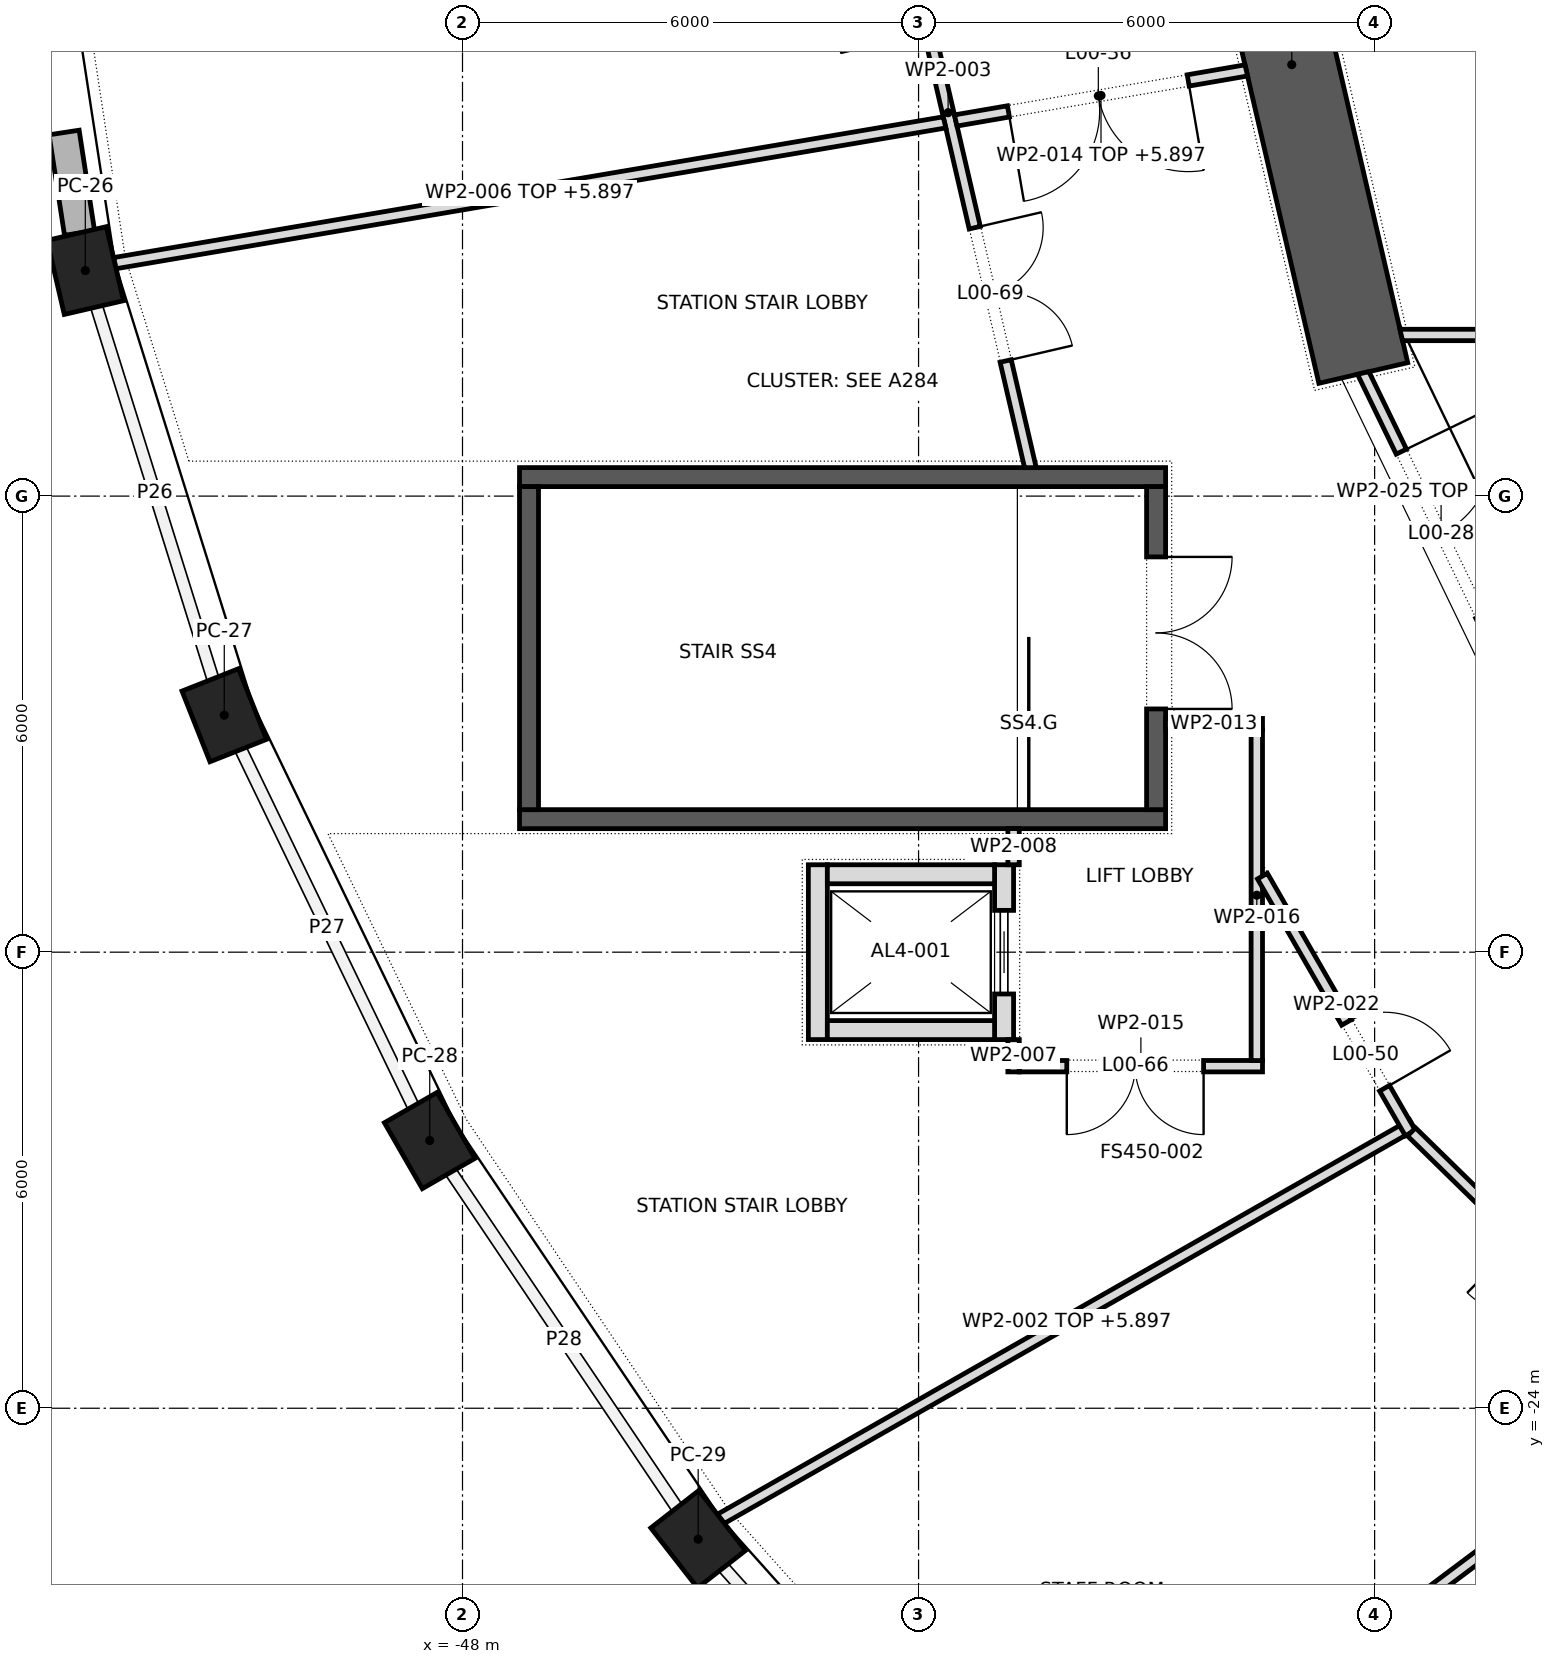
"""IFC4 building model, lengths in metres.
Left out: names, types, materials, properties, quantities, classifications, styles, units other than length and angle.
Written with IfcOpenShell. Run it as: python <this file> out.ifc"""

import sys

from ifc_helpers import new_model, si_unit, direction, frame, frame_2d, origin, origin_2d, place, context, subcontext, project, spatial, polyline, rectangle, outline, extrude, element, fill, save


model = new_model("IFC4")
c1 = context("Model", 3, precision=1e-05, world=origin(), true_north=direction((0.0, 1.0)))
c2 = subcontext(c1, "Body", "Model", "MODEL_VIEW")
j1 = project(units=[si_unit("LENGTHUNIT", "METRE"), si_unit("PLANEANGLEUNIT", "RADIAN")], contexts=[c1])
p1 = place(None, origin())
s1 = spatial("IfcSite", under=j1, at=p1, CompositionType="ELEMENT")
p2 = place(p1, origin())
s2 = spatial("IfcBuilding", under=s1, at=p2, CompositionType="ELEMENT")
p3 = place(p2, origin())
s3 = spatial("IfcBuildingStorey", under=s2, at=p3, CompositionType="ELEMENT", Elevation=0.0)
for number, where, z_axis, x_axis in (
    (1, (-52.962, -9.033, 0.0), (0.0, 0.0, 1.0), (0.226, -0.974, 0.0)),
    (2, (-51.134, -14.883, 0.0), (0.0, 0.0, 1.0), (0.368, -0.93, 0.0)),
    (3, (-48.431, -20.478, 0.0), (0.0, 0.0, 1.0), (0.499, -0.867, 0.0)),
    (4, (-44.899, -25.723, 0.0), (0.0, 0.0, 1.0), (0.615, -0.789, 0.0)),
):
    element("IfcColumn", number, at=place(p3, frame(where, z_axis=z_axis, x_axis=x_axis)), inside=s3, PredefinedType="COLUMN", context=c2, shape_type="SweptSolid", body=[
        extrude(rectangle(XDim=1.0, YDim=0.8, at=origin_2d()), origin(), (0.0, 0.0, 1.0), 7.0),
    ])
p4 = place(p3, frame((-38.032, -2.267, 0.0), z_axis=(0.0, 0.0, 1.0), x_axis=(0.226058185805, -0.974113800657, 0.0)))
e5 = element("IfcWall", 5, at=p4, inside=s3, PredefinedType="SHEAR", context=c2, shape_type="SweptSolid", body=[
    extrude(rectangle(XDim=8.329, YDim=1.2, at=frame_2d((4.165, 0.0))), origin(), (0.0, 0.0, 1.0), 7.0),
])
p5 = place(p3, frame((-53.809, -3.522, 0.0), z_axis=(0.0, 0.0, 1.0), x_axis=(0.151778822734, -0.988414482375, 0.0)))
e6 = element("IfcWall", 6, at=p5, inside=s3, PredefinedType="STANDARD", context=c2, shape_type="SweptSolid", body=[
    extrude(rectangle(XDim=5.075, YDim=0.4, at=frame_2d((2.538, 0.0))), origin(), (0.0, 0.0, 1.0), 6.2),
])
p6 = place(p5, frame((1.337, 0.0, 0.0)))
e7 = element("IfcOpeningElement", 7, at=p6, cuts=e6, PredefinedType="OPENING", context=c2, shape_type="SweptSolid", body=[
    extrude(rectangle(XDim=2.4, YDim=2.4, at=frame_2d((1.2, 1.2))), frame((0.0, 0.212, 0.0), z_axis=(0.0, -1.0, 0.0), x_axis=(1.0, 0.0, 0.0)), (0.0, 0.0, 1.0), 0.424),
])
for number, where, z_axis, x_axis in (
    (8, (-47.25, -11.75, 0.0), (0.0, 0.0, 1.0), (1.0, 0.0, 0.0)),
    (9, (-47.25, -16.25, 0.0), (0.0, 0.0, 1.0), (1.0, 0.0, 0.0)),
):
    element("IfcWall", number, at=place(p3, frame(where, z_axis=z_axis, x_axis=x_axis)), inside=s3, PredefinedType="SHEAR", context=c2, shape_type="SweptSolid", body=[
        extrude(rectangle(XDim=8.5, YDim=0.25, at=frame_2d((4.25, 0.0))), origin(), (0.0, 0.0, 1.0), 6.65),
    ])
p7 = place(p3, frame((-47.125, -16.125, 0.0), z_axis=(0.0, 0.0, 1.0), x_axis=(0.0, 1.0, 0.0)))
e10 = element("IfcWall", 10, at=p7, inside=s3, PredefinedType="SHEAR", context=c2, shape_type="SweptSolid", body=[
    extrude(rectangle(XDim=4.25, YDim=0.25, at=frame_2d((2.125, 0.0))), origin(), (0.0, 0.0, 1.0), 6.65),
])
p8 = place(p3, frame((-38.875, -16.125, 0.0), z_axis=(0.0, 0.0, 1.0), x_axis=(0.0, 1.0, 0.0)))
e11 = element("IfcWall", 11, at=p8, inside=s3, PredefinedType="SHEAR", context=c2, shape_type="SweptSolid", body=[
    extrude(rectangle(XDim=4.25, YDim=0.25, at=frame_2d((2.125, 0.0))), origin(), (0.0, 0.0, 1.0), 6.65),
])
p9 = place(p8, frame((1.325, 0.0, 0.0)))
e12 = element("IfcOpeningElement", 12, at=p9, cuts=e11, PredefinedType="OPENING", context=c2, shape_type="SweptSolid", body=[
    extrude(rectangle(XDim=2.0, YDim=2.1, at=frame_2d((1.0, 1.05))), frame((0.0, 0.137, 0.0), z_axis=(0.0, -1.0, 0.0), x_axis=(1.0, 0.0, 0.0)), (0.0, 0.0, 1.0), 0.274),
])
p10 = place(p3, frame((-43.325, -19.15, 0.0), z_axis=(0.0, 0.0, 1.0), x_axis=(0.0, 1.0, 0.0)))
e13 = element("IfcWall", 13, at=p10, inside=s3, PredefinedType="PARTITIONING", context=c2, shape_type="SweptSolid", body=[
    extrude(rectangle(XDim=2.3, YDim=0.25, at=frame_2d((1.15, 0.0))), origin(), (0.0, 0.0, 1.0), 6.65),
])
p11 = place(p3, frame((-40.875, -19.15, 0.0), z_axis=(0.0, 0.0, 1.0), x_axis=(0.0, 1.0, 0.0)))
e14 = element("IfcWall", 14, at=p11, inside=s3, PredefinedType="PARTITIONING", context=c2, shape_type="SweptSolid", body=[
    extrude(rectangle(XDim=2.3, YDim=0.25, at=frame_2d((1.15, 0.0))), origin(), (0.0, 0.0, 1.0), 6.65),
])
p12 = place(p11, frame((0.6, 0.0, 0.0)))
e15 = element("IfcOpeningElement", 15, at=p12, cuts=e14, PredefinedType="OPENING", context=c2, shape_type="SweptSolid", body=[
    extrude(rectangle(XDim=1.1, YDim=2.1, at=frame_2d((0.55, 1.05))), frame((0.0, 0.137, 0.0), z_axis=(0.0, -1.0, 0.0), x_axis=(1.0, 0.0, 0.0)), (0.0, 0.0, 1.0), 0.274),
])
for number, where, z_axis, x_axis in (
    (16, (-43.2, -16.975, 0.0), (0.0, 0.0, 1.0), (1.0, 0.0, 0.0)),
    (17, (-43.2, -19.025, 0.0), (0.0, 0.0, 1.0), (1.0, 0.0, 0.0)),
):
    element("IfcWall", number, at=place(p3, frame(where, z_axis=z_axis, x_axis=x_axis)), inside=s3, PredefinedType="PARTITIONING", context=c2, shape_type="SweptSolid", body=[
        extrude(rectangle(XDim=2.2, YDim=0.25, at=frame_2d((1.1, 0.0))), origin(), (0.0, 0.0, 1.0), 6.65),
    ])
p13 = place(p3, frame((-44.602, -25.456, 0.0), z_axis=(0.0, 0.0, 1.0), x_axis=(0.868872232998, 0.495036405455, 0.0)))
e18 = element("IfcWall", 18, at=p13, inside=s3, PredefinedType="PARTITIONING", context=c2, shape_type="SweptSolid", body=[
    extrude(outline(polyline([(0.011, -0.075), (10.473, -0.075), (10.473, 0.075), (-0.011, 0.075), (0.011, -0.075)])), origin(), (0.0, 0.0, 1.0), 5.897),
])
p14 = place(p3, frame((-42.694, -2.286, 0.0), z_axis=(0.0, 0.0, 1.0), x_axis=(0.225867367758, -0.974158063243, 0.0)))
e19 = element("IfcWall", 19, at=p14, inside=s3, PredefinedType="PARTITIONING", context=c2, shape_type="SweptSolid", body=[
    extrude(outline(polyline([(0.0, -0.075), (9.57, -0.075), (9.605, 0.075), (0.0, 0.075), (0.0, -0.075)])), origin(), (0.0, 0.0, 1.0), 6.65),
])
p15 = place(p14, frame((1.31, 0.0, 0.0)))
e20 = element("IfcOpeningElement", 20, at=p15, cuts=e19, PredefinedType="OPENING", context=c2, shape_type="SweptSolid", body=[
    extrude(rectangle(XDim=2.4, YDim=2.1, at=frame_2d((1.2, 1.05))), frame((0.0, 0.087, 0.0), z_axis=(0.0, -1.0, 0.0), x_axis=(1.0, 0.0, 0.0)), (0.0, 0.0, 1.0), 0.174),
])
p16 = place(p14, frame((6.347, 0.0, 0.0)))
e21 = element("IfcOpeningElement", 21, at=p16, cuts=e19, PredefinedType="OPENING", context=c2, shape_type="SweptSolid", body=[
    extrude(rectangle(XDim=1.8, YDim=2.1, at=frame_2d((0.9, 1.05))), frame((0.0, 0.087, 0.0), z_axis=(0.0, -1.0, 0.0), x_axis=(1.0, 0.0, 0.0)), (0.0, 0.0, 1.0), 0.174),
])
p17 = place(p3, frame((-41.658, -7.083, 0.0), z_axis=(0.0, 0.0, 1.0), x_axis=(-0.985913056055, -0.167258619806, 0.0)))
e22 = element("IfcWall", 22, at=p17, inside=s3, PredefinedType="PARTITIONING", context=c2, shape_type="SweptSolid", body=[
    extrude(outline(polyline([(0.004, -0.075), (11.077, -0.075), (11.069, 0.075), (-0.004, 0.075), (0.004, -0.075)])), origin(), (0.0, 0.0, 1.0), 5.897),
])
p18 = place(p3, frame((-40.75, -19.575, 0.0), z_axis=(0.0, 0.0, 1.0), x_axis=(0.0, 1.0, 0.0)))
e23 = element("IfcWall", 23, at=p18, inside=s3, PredefinedType="PARTITIONING", context=c2, shape_type="SweptSolid", body=[
    extrude(rectangle(XDim=0.425, YDim=0.15, at=frame_2d((0.212, 0.0))), origin(), (0.0, 0.0, 1.0), 6.65),
])
p19 = place(p3, frame((-40.75, -16.85, 0.0), z_axis=(0.0, 0.0, 1.0), x_axis=(0.0, 1.0, 0.0)))
e24 = element("IfcWall", 24, at=p19, inside=s3, PredefinedType="PARTITIONING", context=c2, shape_type="SweptSolid", body=[
    extrude(rectangle(XDim=0.476, YDim=0.15, at=frame_2d((0.238, 0.0))), origin(), (0.0, 0.0, 1.0), 6.65),
])
p20 = place(p3, frame((-38.751, -15.0, 0.0), z_axis=(0.0, 0.0, 1.0), x_axis=(1.0, 0.0, 0.0)))
e25 = element("IfcWall", 25, at=p20, inside=s3, PredefinedType="PARTITIONING", context=c2, shape_type="SweptSolid", body=[
    extrude(rectangle(XDim=1.276, YDim=0.15, at=frame_2d((0.638, 0.0))), origin(), (0.0, 0.0, 1.0), 6.65),
])
p21 = place(p3, frame((-37.688, -6.4, 0.0), z_axis=(0.0, 0.0, 1.0), x_axis=(-0.985493521891, -0.169713046966, 0.0)))
e26 = element("IfcWall", 26, at=p21, inside=s3, PredefinedType="PARTITIONING", context=c2, shape_type="SweptSolid", body=[
    extrude(outline(polyline([(0.004, -0.075), (3.884, -0.075), (3.875, 0.075), (-0.004, 0.075), (0.004, -0.075)])), origin(), (0.0, 0.0, 1.0), 5.897),
])
p22 = place(p21, frame((0.776, 0.0, 0.0)))
e27 = element("IfcOpeningElement", 27, at=p22, cuts=e26, PredefinedType="OPENING", context=c2, shape_type="SweptSolid", body=[
    extrude(rectangle(XDim=2.4, YDim=2.1, at=frame_2d((1.2, 1.05))), frame((0.0, 0.087, 0.0), z_axis=(0.0, -1.0, 0.0), x_axis=(1.0, 0.0, 0.0)), (0.0, 0.0, 1.0), 0.174),
])
p23 = place(p3, frame((-37.475, -19.5, 0.0), z_axis=(0.0, 0.0, 1.0), x_axis=(-1.0, 0.0, 0.0)))
e28 = element("IfcWall", 28, at=p23, inside=s3, PredefinedType="PARTITIONING", context=c2, shape_type="SweptSolid", body=[
    extrude(rectangle(XDim=3.2, YDim=0.15, at=frame_2d((1.6, 0.0))), origin(), (0.0, 0.0, 1.0), 6.65),
])
p24 = place(p23, frame((0.775, 0.0, 0.0)))
e29 = element("IfcOpeningElement", 29, at=p24, cuts=e28, PredefinedType="OPENING", context=c2, shape_type="SweptSolid", body=[
    extrude(rectangle(XDim=1.8, YDim=2.1, at=frame_2d((0.9, 1.05))), frame((0.0, 0.087, 0.0), z_axis=(0.0, -1.0, 0.0), x_axis=(1.0, 0.0, 0.0)), (0.0, 0.0, 1.0), 0.174),
])
p25 = place(p3, frame((-37.55, -19.426, 0.0), z_axis=(0.0, 0.0, 1.0), x_axis=(0.0, 1.0, 0.0)))
e30 = element("IfcWall", 30, at=p25, inside=s3, PredefinedType="PARTITIONING", context=c2, shape_type="SweptSolid", body=[
    extrude(rectangle(XDim=4.351, YDim=0.15, at=frame_2d((2.176, 0.0))), origin(), (0.0, 0.0, 1.0), 6.65),
])
p26 = place(p3, frame((-35.531, -20.378, 0.0), z_axis=(0.0, 0.0, 1.0), x_axis=(-0.498840465352, 0.866693827212, 0.0)))
e31 = element("IfcWall", 31, at=p26, inside=s3, PredefinedType="PARTITIONING", context=c2, shape_type="SweptSolid", body=[
    extrude(rectangle(XDim=3.899, YDim=0.15, at=frame_2d((1.95, 0.0))), origin(), (0.0, 0.0, 1.0), 6.65),
])
p27 = place(p26, frame((0.679, 0.0, 0.0)))
e32 = element("IfcOpeningElement", 32, at=p27, cuts=e31, PredefinedType="OPENING", context=c2, shape_type="SweptSolid", body=[
    extrude(rectangle(XDim=1.0, YDim=2.1, at=frame_2d((0.5, 1.05))), frame((0.0, 0.087, 0.0), z_axis=(0.0, -1.0, 0.0), x_axis=(1.0, 0.0, 0.0)), (0.0, 0.0, 1.0), 0.174),
])
p28 = place(p3, frame((-35.514, -20.365, 0.0), z_axis=(0.0, 0.0, 1.0), x_axis=(0.714835312925, -0.699292839514, 0.0)))
e33 = element("IfcWall", 33, at=p28, inside=s3, PredefinedType="PARTITIONING", context=c2, shape_type="SweptSolid", body=[
    extrude(rectangle(XDim=10.304, YDim=0.15, at=frame_2d((5.152, 0.0))), origin(), (0.0, 0.0, 1.0), 6.65),
])
p29 = place(p28, frame((2.004, 0.0, 0.0)))
e34 = element("IfcOpeningElement", 34, at=p29, cuts=e33, PredefinedType="OPENING", context=c2, shape_type="SweptSolid", body=[
    extrude(rectangle(XDim=1.0, YDim=2.1, at=frame_2d((0.5, 1.05))), frame((0.0, 0.087, 0.0), z_axis=(0.0, -1.0, 0.0), x_axis=(1.0, 0.0, 0.0)), (0.0, 0.0, 1.0), 0.174),
])
p30 = place(p3, frame((-34.101, -14.609, 0.0), z_axis=(0.0, 0.0, 1.0), x_axis=(-0.436102687495, 0.899896908518, 0.0)))
e35 = element("IfcWall", 35, at=p30, inside=s3, PredefinedType="PARTITIONING", context=c2, shape_type="SweptSolid", body=[
    extrude(outline(polyline([(0.016, -0.075), (4.682, -0.075), (4.716, 0.075), (-0.016, 0.075), (0.016, -0.075)])), origin(), (0.0, 0.0, 1.0), 6.1),
])
p31 = place(p30, frame((1.149, 0.0, 0.0)))
e36 = element("IfcOpeningElement", 36, at=p31, cuts=e35, PredefinedType="OPENING", context=c2, shape_type="SweptSolid", body=[
    extrude(rectangle(XDim=2.4, YDim=2.1, at=frame_2d((1.2, 1.05))), frame((0.0, 0.087, 0.0), z_axis=(0.0, -1.0, 0.0), x_axis=(1.0, 0.0, 0.0)), (0.0, 0.0, 1.0), 0.174),
])
p32 = place(p3, frame((-31.96, -23.945, 0.0), z_axis=(0.0, 0.0, 1.0), x_axis=(-0.800117504973, -0.599843294732, 0.0)))
e37 = element("IfcWall", 37, at=p32, inside=s3, PredefinedType="PARTITIONING", context=c2, shape_type="SweptSolid", body=[
    extrude(outline(polyline([(0.011, -0.075), (10.482, -0.075), (10.459, 0.075), (-0.011, 0.075), (0.011, -0.075)])), origin(), (0.0, 0.0, 1.0), 6.05),
])
p33 = place(p3, frame((-18.999, -9.88, 0.0), z_axis=(0.0, 0.0, 1.0), x_axis=(-1.0, 0.0, 0.0)))
e38 = element("IfcWall", 38, at=p33, inside=s3, PredefinedType="PARTITIONING", context=c2, shape_type="SweptSolid", body=[
    extrude(outline(polyline([(0.0, -0.075), (16.668, -0.075), (16.634, 0.075), (0.0, 0.075), (0.0, -0.075)])), origin(), (0.0, 0.0, 1.0), 6.65),
])
p34 = place(p33, frame((7.406, 0.0, 0.0)))
e39 = element("IfcOpeningElement", 39, at=p34, cuts=e38, PredefinedType="OPENING", context=c2, shape_type="SweptSolid", body=[
    extrude(rectangle(XDim=1.8, YDim=2.1, at=frame_2d((0.9, 1.05))), frame((0.0, 0.087, 0.0), z_axis=(0.0, -1.0, 0.0), x_axis=(1.0, 0.0, 0.0)), (0.0, 0.0, 1.0), 0.174),
])
p35 = place(p6, frame((2.4, 0.0, 0.0), z_axis=(0.0, 0.0, 1.0), x_axis=(-1.0, 0.0, 0.0)))
e40 = element("IfcDoor", 40, at=p35, inside=s3, OperationType="DOUBLE_DOOR_SINGLE_SWING", PredefinedType="DOOR", context=c2, shape_type="SweptSolid", body=[
    extrude(rectangle(XDim=2.4, YDim=2.4, at=frame_2d((1.2, 1.2))), frame((0.0, 0.025, 0.0), z_axis=(0.0, -1.0, 0.0), x_axis=(1.0, 0.0, 0.0)), (0.0, 0.0, 1.0), 0.05),
])
fill(e7, e40)
p36 = place(p12, origin())
e41 = element("IfcDoor", 41, at=p36, inside=s3, OperationType="SLIDING_TO_LEFT", PredefinedType="DOOR", context=c2, shape_type="SweptSolid", body=[
    extrude(rectangle(XDim=1.1, YDim=2.1, at=frame_2d((0.55, 1.05))), frame((0.0, 0.025, 0.0), z_axis=(0.0, -1.0, 0.0), x_axis=(1.0, 0.0, 0.0)), (0.0, 0.0, 1.0), 0.05),
])
fill(e15, e41)
p37 = place(p9, frame((2.0, 0.0, 0.0), z_axis=(0.0, 0.0, 1.0), x_axis=(-1.0, 0.0, 0.0)))
e42 = element("IfcDoor", 42, at=p37, inside=s3, OperationType="DOUBLE_DOOR_SINGLE_SWING", PredefinedType="DOOR", context=c2, shape_type="SweptSolid", body=[
    extrude(rectangle(XDim=2.0, YDim=2.1, at=frame_2d((1.0, 1.05))), frame((0.0, 0.025, 0.0), z_axis=(0.0, -1.0, 0.0), x_axis=(1.0, 0.0, 0.0)), (0.0, 0.0, 1.0), 0.05),
])
fill(e12, e42)
p38 = place(p31, frame((2.4, 0.0, 0.0), z_axis=(0.0, 0.0, 1.0), x_axis=(-1.0, 0.0, 0.0)))
e43 = element("IfcDoor", 43, at=p38, inside=s3, OperationType="DOUBLE_DOOR_SINGLE_SWING", PredefinedType="DOOR", context=c2, shape_type="SweptSolid", body=[
    extrude(rectangle(XDim=2.4, YDim=2.1, at=frame_2d((1.2, 1.05))), frame((0.0, 0.025, 0.0), z_axis=(0.0, -1.0, 0.0), x_axis=(1.0, 0.0, 0.0)), (0.0, 0.0, 1.0), 0.05),
])
fill(e36, e43)
p39 = place(p22, origin())
e44 = element("IfcDoor", 44, at=p39, inside=s3, OperationType="DOUBLE_DOOR_SINGLE_SWING", PredefinedType="DOOR", context=c2, shape_type="SweptSolid", body=[
    extrude(rectangle(XDim=2.4, YDim=2.1, at=frame_2d((1.2, 1.05))), frame((0.0, 0.025, 0.0), z_axis=(0.0, -1.0, 0.0), x_axis=(1.0, 0.0, 0.0)), (0.0, 0.0, 1.0), 0.05),
])
fill(e27, e44)
p40 = place(p27, frame((1.0, 0.0, 0.0), z_axis=(0.0, 0.0, 1.0), x_axis=(-1.0, 0.0, 0.0)))
e45 = element("IfcDoor", 45, at=p40, inside=s3, OperationType="SINGLE_SWING_LEFT", PredefinedType="DOOR", context=c2, shape_type="SweptSolid", body=[
    extrude(rectangle(XDim=1.0, YDim=2.1, at=frame_2d((0.5, 1.05))), frame((0.0, 0.025, 0.0), z_axis=(0.0, -1.0, 0.0), x_axis=(1.0, 0.0, 0.0)), (0.0, 0.0, 1.0), 0.05),
])
fill(e32, e45)
p41 = place(p24, origin())
e46 = element("IfcDoor", 46, at=p41, inside=s3, OperationType="DOUBLE_DOOR_SINGLE_SWING", PredefinedType="DOOR", context=c2, shape_type="SweptSolid", body=[
    extrude(rectangle(XDim=1.8, YDim=2.1, at=frame_2d((0.9, 1.05))), frame((0.0, 0.025, 0.0), z_axis=(0.0, -1.0, 0.0), x_axis=(1.0, 0.0, 0.0)), (0.0, 0.0, 1.0), 0.05),
])
fill(e29, e46)
p42 = place(p16, origin())
e47 = element("IfcDoor", 47, at=p42, inside=s3, OperationType="DOUBLE_DOOR_SINGLE_SWING", PredefinedType="DOOR", context=c2, shape_type="SweptSolid", body=[
    extrude(rectangle(XDim=1.8, YDim=2.1, at=frame_2d((0.9, 1.05))), frame((0.0, 0.025, 0.0), z_axis=(0.0, -1.0, 0.0), x_axis=(1.0, 0.0, 0.0)), (0.0, 0.0, 1.0), 0.05),
])
fill(e21, e47)
save(model, sys.argv[1])
